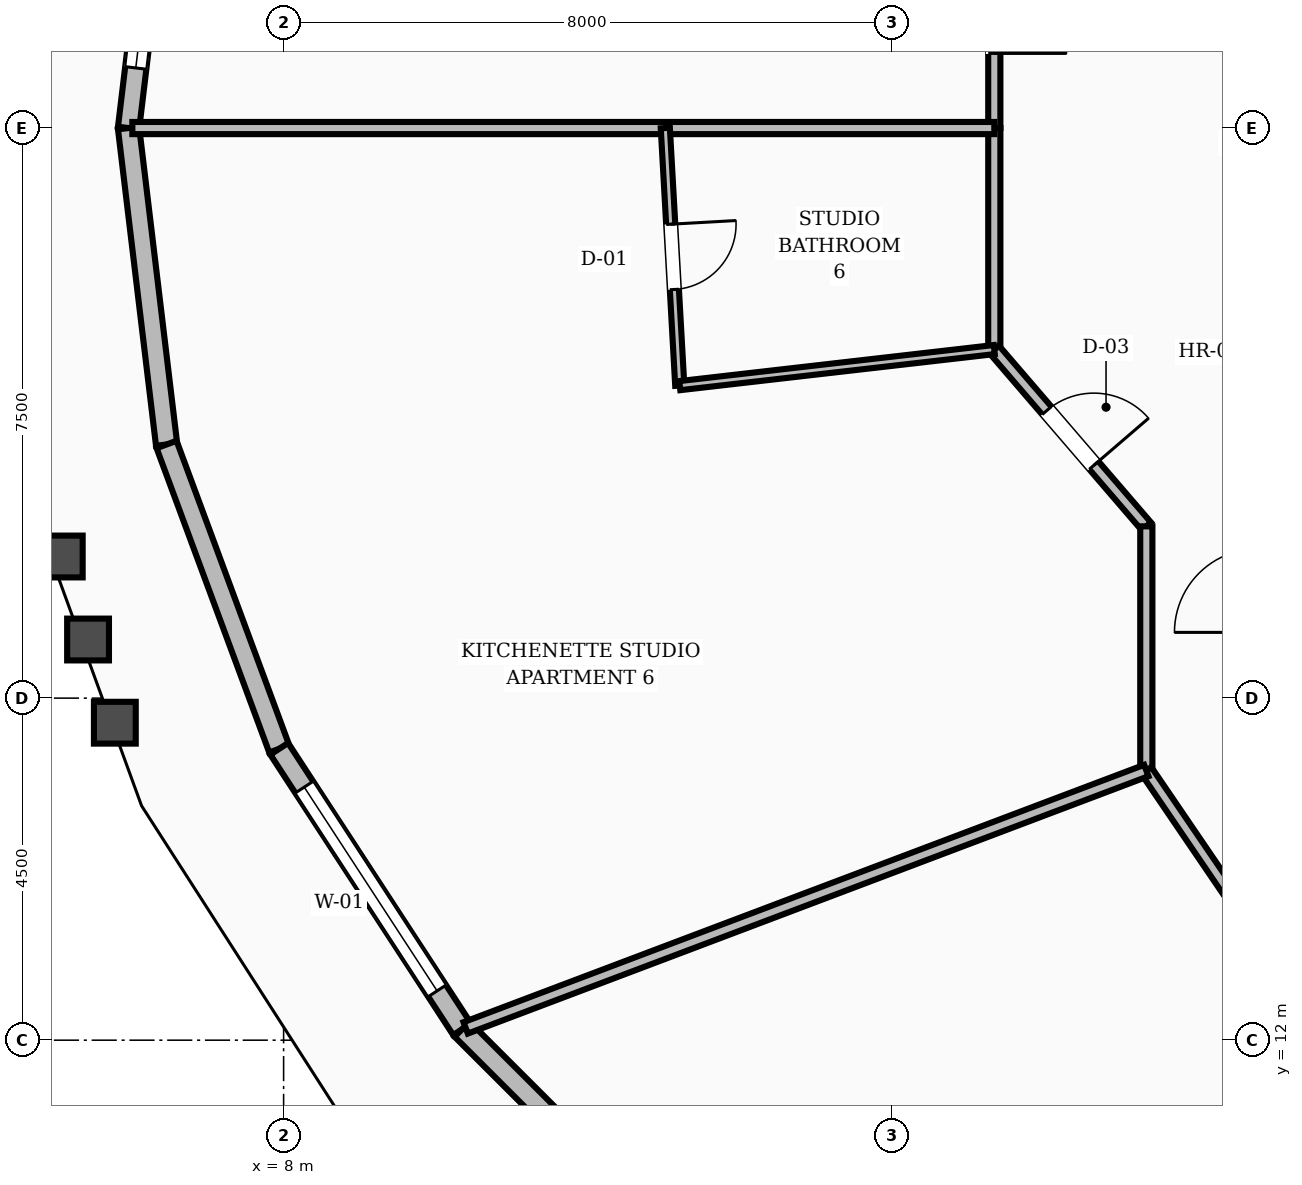
"""IFC4 building model, lengths in metres.
Left out: names, types, materials, properties, quantities, classifications, styles, units other than length and angle.
Written with IfcOpenShell. Run it as: python <this file> out.ifc"""

import sys

from ifc_helpers import new_model, si_unit, direction, frame, frame_2d, origin, place, context, subcontext, project, spatial, rectangle, extrude, element, fill, save


model = new_model("IFC4")
c1 = context("Model", 3, precision=1e-05, world=origin(), true_north=direction((0.0, 1.0)))
c2 = subcontext(c1, "Body", "Model", "MODEL_VIEW")
j1 = project(units=[si_unit("LENGTHUNIT", "METRE"), si_unit("PLANEANGLEUNIT", "RADIAN")], contexts=[c1])
p1 = place(None, origin())
s1 = spatial("IfcSite", under=j1, at=p1, CompositionType="ELEMENT")
p2 = place(p1, origin())
s2 = spatial("IfcBuilding", under=s1, at=p2, CompositionType="ELEMENT")
p3 = place(p2, frame((0.0, 0.0, 174.8)))
s3 = spatial("IfcBuildingStorey", under=s2, at=p3, CompositionType="ELEMENT", Elevation=174.8)
p4 = place(p3, frame((6.46, 28.163, 0.0), z_axis=(0.0, 0.0, 1.0), x_axis=(-0.119361035634, -0.992850916892, 0.0)))
e1 = element("IfcWall", 1, at=p4, inside=s3, PredefinedType="STANDARD", context=c2, shape_type="SweptSolid", body=[
    extrude(rectangle(XDim=4.193, YDim=0.28, at=frame_2d((2.097, 0.0))), origin(), (0.0, 0.0, 1.0), 2.82),
])
p5 = place(p4, frame((0.797, 0.0, 0.8)))
e2 = element("IfcOpeningElement", 2, at=p5, cuts=e1, PredefinedType="OPENING", context=c2, shape_type="SweptSolid", body=[
    extrude(rectangle(XDim=2.6, YDim=1.65, at=frame_2d((1.3, 0.825))), frame((0.0, 0.15, 0.0), z_axis=(0.0, -1.0, 0.0), x_axis=(1.0, 0.0, 0.0)), (0.0, 0.0, 1.0), 0.3),
])
p6 = place(p3, frame((5.96, 24.0, 0.0), z_axis=(0.0, 0.0, 1.0), x_axis=(0.119361035634, -0.992850916892, 0.0)))
e3 = element("IfcWall", 3, at=p6, inside=s3, PredefinedType="STANDARD", context=c2, shape_type="SweptSolid", body=[
    extrude(rectangle(XDim=4.193, YDim=0.28, at=frame_2d((2.097, 0.0))), origin(), (0.0, 0.0, 1.0), 2.82),
])
p7 = place(p3, frame((6.46, 19.837, 0.0), z_axis=(0.0, 0.0, 1.0), x_axis=(0.347096410893, -0.93782945227, 0.0)))
e4 = element("IfcWall", 4, at=p7, inside=s3, PredefinedType="STANDARD", context=c2, shape_type="SweptSolid", body=[
    extrude(rectangle(XDim=4.269, YDim=0.28, at=frame_2d((2.134, 0.0))), origin(), (0.0, 0.0, 1.0), 2.82),
])
p8 = place(p3, frame((7.942, 15.833, 0.0), z_axis=(0.0, 0.0, 1.0), x_axis=(0.54628130625, -0.837601775573, 0.0)))
e5 = element("IfcWall", 5, at=p8, inside=s3, PredefinedType="STANDARD", context=c2, shape_type="SweptSolid", body=[
    extrude(rectangle(XDim=4.405, YDim=0.28, at=frame_2d((2.202, 0.0))), origin(), (0.0, 0.0, 1.0), 2.82),
])
p9 = place(p8, frame((0.602, 0.0, 0.8)))
e6 = element("IfcOpeningElement", 6, at=p9, cuts=e5, PredefinedType="OPENING", context=c2, shape_type="SweptSolid", body=[
    extrude(rectangle(XDim=3.2, YDim=1.65, at=frame_2d((1.6, 0.825))), frame((0.0, 0.15, 0.0), z_axis=(0.0, -1.0, 0.0), x_axis=(1.0, 0.0, 0.0)), (0.0, 0.0, 1.0), 0.3),
])
p10 = place(p3, frame((10.348, 12.144, 0.0), z_axis=(0.0, 0.0, 1.0), x_axis=(0.707640043992, -0.706573115919, 0.0)))
e7 = element("IfcWall", 7, at=p10, inside=s3, PredefinedType="STANDARD", context=c2, shape_type="SweptSolid", body=[
    extrude(rectangle(XDim=4.576, YDim=0.28, at=frame_2d((2.288, 0.0))), origin(), (0.0, 0.0, 1.0), 2.82),
])
p11 = place(p3, frame((17.35, 26.914, 0.0), z_axis=(0.0, 0.0, 1.0), x_axis=(0.0, -1.0, 0.0)))
e8 = element("IfcWall", 8, at=p11, inside=s3, PredefinedType="SOLIDWALL", context=c2, shape_type="SweptSolid", body=[
    extrude(rectangle(XDim=2.914, YDim=0.16, at=frame_2d((1.457, 0.0))), origin(), (0.0, 0.0, 1.0), 2.8),
])
p12 = place(p11, frame((0.982, 0.0, 0.0)))
e9 = element("IfcOpeningElement", 9, at=p12, cuts=e8, PredefinedType="OPENING", context=c2, shape_type="SweptSolid", body=[
    extrude(rectangle(XDim=0.95, YDim=2.1, at=frame_2d((0.475, 1.05))), frame((0.0, 0.09, 0.0), z_axis=(0.0, -1.0, 0.0), x_axis=(1.0, 0.0, 0.0)), (0.0, 0.0, 1.0), 0.18),
])
p13 = place(p3, frame((17.35, 24.0, 0.0), z_axis=(0.0, 0.0, 1.0), x_axis=(0.0, -1.0, 0.0)))
e10 = element("IfcWall", 10, at=p13, inside=s3, PredefinedType="SOLIDWALL", context=c2, shape_type="SweptSolid", body=[
    extrude(rectangle(XDim=2.914, YDim=0.16, at=frame_2d((1.457, 0.0))), origin(), (0.0, 0.0, 1.0), 2.8),
])
p14 = place(p3, frame((17.35, 21.086, 0.0), z_axis=(0.0, 0.0, 1.0), x_axis=(0.652022797448, -0.758199361388, 0.0)))
e11 = element("IfcWall", 11, at=p14, inside=s3, PredefinedType="SOLIDWALL", context=c2, shape_type="SweptSolid", body=[
    extrude(rectangle(XDim=3.067, YDim=0.16, at=frame_2d((1.534, 0.0))), origin(), (0.0, 0.0, 1.0), 2.8),
])
p15 = place(p14, frame((1.059, 0.0, 0.0)))
e12 = element("IfcOpeningElement", 12, at=p15, cuts=e11, PredefinedType="OPENING", context=c2, shape_type="SweptSolid", body=[
    extrude(rectangle(XDim=0.95, YDim=2.1, at=frame_2d((0.475, 1.05))), frame((0.0, 0.09, 0.0), z_axis=(0.0, -1.0, 0.0), x_axis=(1.0, 0.0, 0.0)), (0.0, 0.0, 1.0), 0.18),
])
p16 = place(p3, frame((19.35, 18.76, 0.0), z_axis=(0.0, 0.0, 1.0), x_axis=(0.0, -1.0, 0.0)))
e13 = element("IfcWall", 13, at=p16, inside=s3, PredefinedType="SOLIDWALL", context=c2, shape_type="SweptSolid", body=[
    extrude(rectangle(XDim=3.213, YDim=0.16, at=frame_2d((1.606, 0.0))), origin(), (0.0, 0.0, 1.0), 2.8),
])
p17 = place(p3, frame((19.35, 15.548, 0.0), z_axis=(0.0, 0.0, 1.0), x_axis=(0.562674669208, -0.826678423955, 0.0)))
e14 = element("IfcWall", 14, at=p17, inside=s3, PredefinedType="SOLIDWALL", context=c2, shape_type="SweptSolid", body=[
    extrude(rectangle(XDim=3.021, YDim=0.16, at=frame_2d((1.511, 0.0))), origin(), (0.0, 0.0, 1.0), 2.8),
])
p18 = place(p3, frame((17.35, 24.0, 0.0), z_axis=(0.0, 0.0, 1.0), x_axis=(-1.0, 0.0, 0.0)))
e15 = element("IfcWall", 15, at=p18, inside=s3, PredefinedType="SOLIDWALL", context=c2, shape_type="SweptSolid", body=[
    extrude(rectangle(XDim=11.34, YDim=0.16, at=frame_2d((5.67, 0.0))), origin(), (0.0, 0.0, 1.0), 2.8),
])
p19 = place(p3, frame((13.022, 24.0, 0.0), z_axis=(0.0, 0.0, 1.0), x_axis=(0.056031711183, -0.998428989634, 0.0)))
e16 = element("IfcWall", 16, at=p19, inside=s3, PredefinedType="PARTITIONING", context=c2, shape_type="SweptSolid", body=[
    extrude(rectangle(XDim=3.394, YDim=0.12, at=frame_2d((1.697, 0.0))), origin(), (0.0, 0.0, 1.0), 2.8),
])
p20 = place(p19, frame((1.267, 0.0, 0.0)))
e17 = element("IfcOpeningElement", 17, at=p20, cuts=e16, PredefinedType="OPENING", context=c2, shape_type="SweptSolid", body=[
    extrude(rectangle(XDim=0.86, YDim=2.1, at=frame_2d((0.43, 1.05))), frame((0.0, 0.07, 0.0), z_axis=(0.0, -1.0, 0.0), x_axis=(1.0, 0.0, 0.0)), (0.0, 0.0, 1.0), 0.14),
])
p21 = place(p3, frame((17.35, 21.086, 0.0), z_axis=(0.0, 0.0, 1.0), x_axis=(-0.993480615662, -0.114001167992, 0.0)))
e18 = element("IfcWall", 18, at=p21, inside=s3, PredefinedType="PARTITIONING", context=c2, shape_type="SweptSolid", body=[
    extrude(rectangle(XDim=4.165, YDim=0.12, at=frame_2d((2.083, 0.0))), origin(), (0.0, 0.0, 1.0), 2.8),
])
p22 = place(p3, frame((19.35, 15.548, 0.0), z_axis=(0.0, 0.0, 1.0), x_axis=(-0.935375198529, -0.353656949568, 0.0)))
e19 = element("IfcWall", 19, at=p22, inside=s3, PredefinedType="SOLIDWALL", context=c2, shape_type="SweptSolid", body=[
    extrude(rectangle(XDim=9.573, YDim=0.16, at=frame_2d((4.787, 0.0))), origin(), (0.0, 0.0, 1.0), 2.8),
])
p23 = place(p5, origin())
e20 = element("IfcWindow", 20, at=p23, inside=s3, PartitioningType="SINGLE_PANEL", PredefinedType="WINDOW", context=c2, shape_type="SweptSolid", body=[
    extrude(rectangle(XDim=2.6, YDim=1.65, at=frame_2d((1.3, 0.825))), frame((0.0, 0.03, 0.0), z_axis=(0.0, -1.0, 0.0), x_axis=(1.0, 0.0, 0.0)), (0.0, 0.0, 1.0), 0.06),
])
fill(e2, e20)
p24 = place(p9, origin())
e21 = element("IfcWindow", 21, at=p24, inside=s3, PartitioningType="SINGLE_PANEL", PredefinedType="WINDOW", context=c2, shape_type="SweptSolid", body=[
    extrude(rectangle(XDim=3.2, YDim=1.65, at=frame_2d((1.6, 0.825))), frame((0.0, 0.03, 0.0), z_axis=(0.0, -1.0, 0.0), x_axis=(1.0, 0.0, 0.0)), (0.0, 0.0, 1.0), 0.06),
])
fill(e6, e21)
p25 = place(p12, origin())
e22 = element("IfcDoor", 22, at=p25, inside=s3, OperationType="SINGLE_SWING_RIGHT", PredefinedType="DOOR", context=c2, shape_type="SweptSolid", body=[
    extrude(rectangle(XDim=0.95, YDim=2.1, at=frame_2d((0.475, 1.05))), frame((0.0, 0.025, 0.0), z_axis=(0.0, -1.0, 0.0), x_axis=(1.0, 0.0, 0.0)), (0.0, 0.0, 1.0), 0.05),
])
fill(e9, e22)
p26 = place(p20, origin())
e23 = element("IfcDoor", 23, at=p26, inside=s3, OperationType="SINGLE_SWING_LEFT", PredefinedType="DOOR", context=c2, shape_type="SweptSolid", body=[
    extrude(rectangle(XDim=0.86, YDim=2.1, at=frame_2d((0.43, 1.05))), frame((0.0, 0.025, 0.0), z_axis=(0.0, -1.0, 0.0), x_axis=(1.0, 0.0, 0.0)), (0.0, 0.0, 1.0), 0.05),
])
fill(e17, e23)
p27 = place(p15, origin())
e24 = element("IfcDoor", 24, at=p27, inside=s3, OperationType="SINGLE_SWING_RIGHT", PredefinedType="DOOR", context=c2, shape_type="SweptSolid", body=[
    extrude(rectangle(XDim=0.95, YDim=2.1, at=frame_2d((0.475, 1.05))), frame((0.0, 0.025, 0.0), z_axis=(0.0, -1.0, 0.0), x_axis=(1.0, 0.0, 0.0)), (0.0, 0.0, 1.0), 0.05),
])
fill(e12, e24)
save(model, sys.argv[1])
